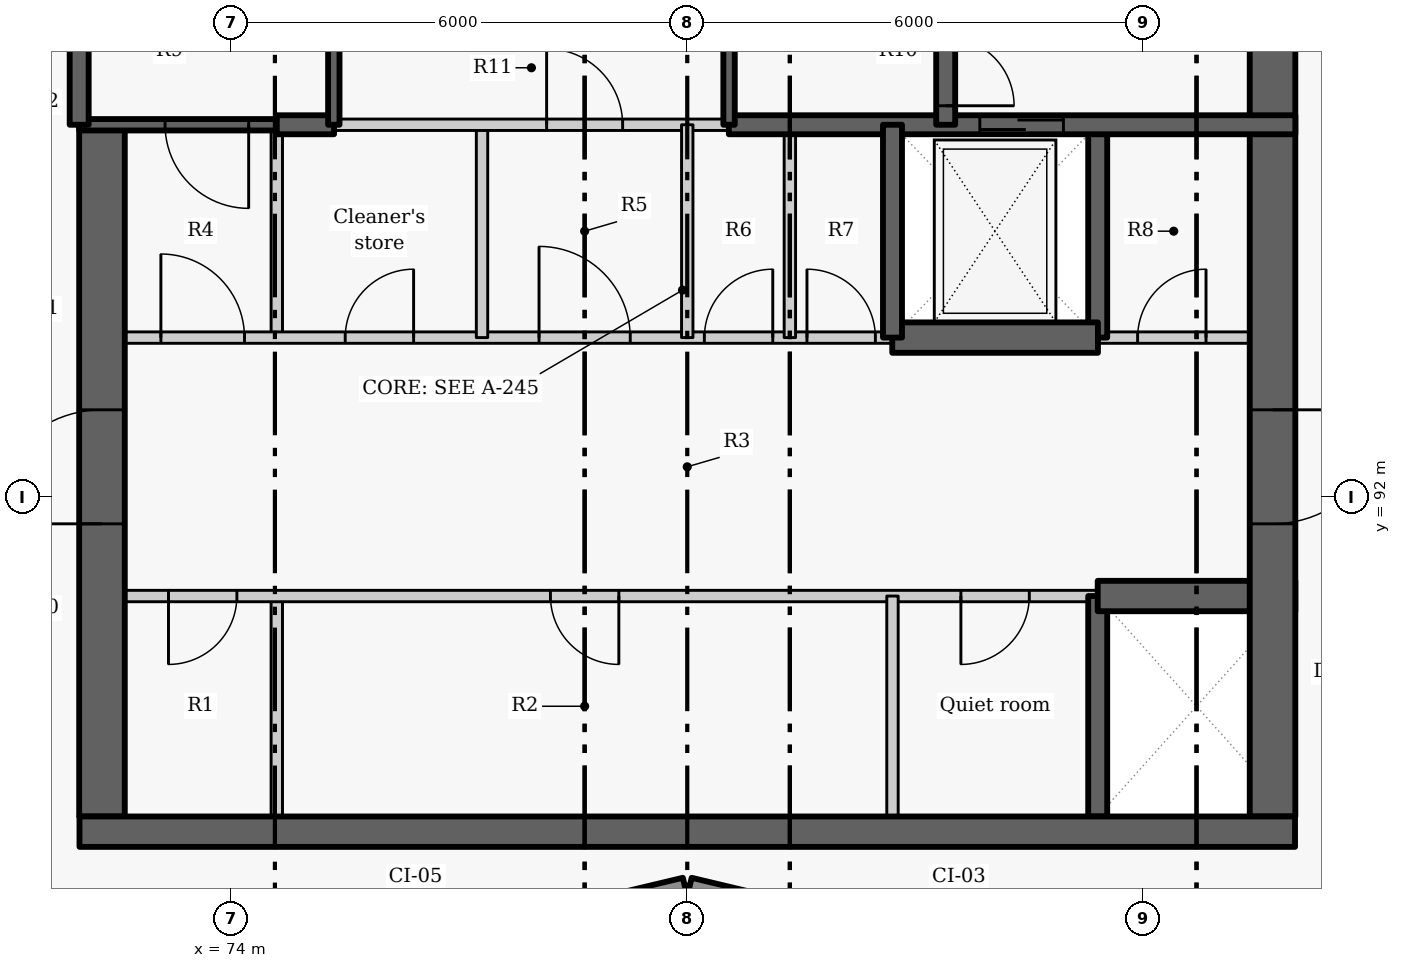
"""IFC4 building model, lengths in metres.
Left out: names, types, materials, properties, quantities, classifications, styles, units other than length and angle.
Written with IfcOpenShell. Run it as: python <this file> out.ifc"""

import sys

from ifc_helpers import new_model, si_unit, direction, frame, frame_2d, origin, place, context, subcontext, project, spatial, rectangle, extrude, element, fill, save


model = new_model("IFC4")
c1 = context("Model", 3, precision=1e-05, world=origin(), true_north=direction((0.0, 1.0)))
c2 = subcontext(c1, "Body", "Model", "MODEL_VIEW")
j1 = project(units=[si_unit("LENGTHUNIT", "METRE"), si_unit("PLANEANGLEUNIT", "RADIAN")], contexts=[c1])
p1 = place(None, origin())
s1 = spatial("IfcSite", under=j1, at=p1, CompositionType="ELEMENT")
p2 = place(p1, origin())
s2 = spatial("IfcBuilding", under=s1, at=p2, CompositionType="ELEMENT")
p3 = place(p2, frame((0.0, 0.0, 272.4)))
s3 = spatial("IfcBuildingStorey", under=s2, at=p3, CompositionType="ELEMENT", Elevation=272.4)
for number, where, z_axis, x_axis in (
    (1, (76.814, 86.119, 0.0), (0.0, 0.0, 1.0), (0.973, 0.232, 0.0)),
    (2, (80.029, 86.872, 0.0), (0.0, 0.0, 1.0), (0.973, -0.232, 0.0)),
):
    element("IfcWall", number, at=place(p3, frame(where, z_axis=z_axis, x_axis=x_axis)), inside=s3, PredefinedType="SOLIDWALL", context=c2, shape_type="SweptSolid", body=[
        extrude(rectangle(XDim=3.246, YDim=0.25, at=frame_2d((1.623, 0.0))), origin(), (0.0, 0.0, 1.0), 2.725),
    ])
p4 = place(p3, frame((74.6, 87.8, 0.0), z_axis=(0.0, 0.0, 1.0), x_axis=(0.0, 1.0, 0.0)))
e3 = element("IfcWall", 3, at=p4, inside=s3, PredefinedType="PARTITIONING", context=c2, shape_type="SweptSolid", body=[
    extrude(rectangle(XDim=2.9, YDim=0.15, at=frame_2d((1.45, 0.0))), origin(), (0.0, 0.0, 1.0), 3.325),
])
p5 = place(p3, frame((74.6, 94.1, 0.0), z_axis=(0.0, 0.0, 1.0), x_axis=(0.0, 1.0, 0.0)))
e4 = element("IfcWall", 4, at=p5, inside=s3, PredefinedType="PARTITIONING", context=c2, shape_type="SweptSolid", body=[
    extrude(rectangle(XDim=2.8, YDim=0.15, at=frame_2d((1.4, 0.0))), origin(), (0.0, 0.0, 1.0), 3.325),
])
p6 = place(p3, frame((85.4, 90.7, 0.0), z_axis=(0.0, 0.0, 1.0), x_axis=(-1.0, 0.0, 0.0)))
e5 = element("IfcWall", 5, at=p6, inside=s3, PredefinedType="PARTITIONING", context=c2, shape_type="SweptSolid", body=[
    extrude(rectangle(XDim=13.4, YDim=0.15, at=frame_2d((6.7, 0.0))), origin(), (0.0, 0.0, 1.0), 3.325),
])
p7 = place(p6, frame((11.325, 0.0, 0.0)))
e6 = element("IfcOpeningElement", 6, at=p7, cuts=e5, PredefinedType="OPENING", context=c2, shape_type="SweptSolid", body=[
    extrude(rectangle(XDim=0.9, YDim=2.1, at=frame_2d((0.45, 1.05))), frame((0.0, 0.085, 0.0), z_axis=(0.0, -1.0, 0.0), x_axis=(1.0, 0.0, 0.0)), (0.0, 0.0, 1.0), 0.17),
])
p8 = place(p6, frame((6.3, 0.0, 0.0)))
e7 = element("IfcOpeningElement", 7, at=p8, cuts=e5, PredefinedType="OPENING", context=c2, shape_type="SweptSolid", body=[
    extrude(rectangle(XDim=0.9, YDim=2.1, at=frame_2d((0.45, 1.05))), frame((0.0, 0.085, 0.0), z_axis=(0.0, -1.0, 0.0), x_axis=(1.0, 0.0, 0.0)), (0.0, 0.0, 1.0), 0.17),
])
p9 = place(p6, frame((0.9, 0.0, 0.0)))
e8 = element("IfcOpeningElement", 8, at=p9, cuts=e5, PredefinedType="OPENING", context=c2, shape_type="SweptSolid", body=[
    extrude(rectangle(XDim=0.9, YDim=2.1, at=frame_2d((0.45, 1.05))), frame((0.0, 0.085, 0.0), z_axis=(0.0, -1.0, 0.0), x_axis=(1.0, 0.0, 0.0)), (0.0, 0.0, 1.0), 0.17),
])
p10 = place(p3, frame((72.3, 87.8, -0.275), z_axis=(0.0, 0.0, 1.0), x_axis=(0.0, 1.0, 0.0)))
e9 = element("IfcWall", 9, at=p10, inside=s3, PredefinedType="SHEAR", context=c2, shape_type="SweptSolid", body=[
    extrude(rectangle(XDim=9.1, YDim=0.6, at=frame_2d((4.55, 0.0))), origin(), (0.0, 0.0, 1.0), 3.6),
])
p11 = place(p10, frame((3.85, 0.0, 0.275)))
e10 = element("IfcOpeningElement", 10, at=p11, cuts=e9, PredefinedType="OPENING", context=c2, shape_type="SweptSolid", body=[
    extrude(rectangle(XDim=1.5, YDim=2.1, at=frame_2d((0.75, 1.05))), frame((0.0, 0.31, 0.0), z_axis=(0.0, -1.0, 0.0), x_axis=(1.0, 0.0, 0.0)), (0.0, 0.0, 1.0), 0.62),
])
p12 = place(p3, frame((85.4, 87.8, -0.275), z_axis=(0.0, 0.0, 1.0), x_axis=(0.0, 1.0, 0.0)))
e11 = element("IfcWall", 11, at=p12, inside=s3, PredefinedType="SHEAR", context=c2, shape_type="SweptSolid", body=[
    extrude(rectangle(XDim=2.9, YDim=0.25, at=frame_2d((1.45, 0.0))), origin(), (0.0, 0.0, 1.0), 3.6),
])
p13 = place(p3, frame((85.4, 94.1, -0.275), z_axis=(0.0, 0.0, 1.0), x_axis=(0.0, 1.0, 0.0)))
e12 = element("IfcWall", 12, at=p13, inside=s3, PredefinedType="SHEAR", context=c2, shape_type="SweptSolid", body=[
    extrude(rectangle(XDim=2.8, YDim=0.25, at=frame_2d((1.4, 0.0))), origin(), (0.0, 0.0, 1.0), 3.6),
])
p14 = place(p3, frame((85.4, 90.7, -0.275), z_axis=(0.0, 0.0, 1.0), x_axis=(1.0, 0.0, 0.0)))
e13 = element("IfcWall", 13, at=p14, inside=s3, PredefinedType="SHEAR", context=c2, shape_type="SweptSolid", body=[
    extrude(rectangle(XDim=2.6, YDim=0.4, at=frame_2d((1.3, 0.0))), origin(), (0.0, 0.0, 1.0), 3.6),
])
p15 = place(p3, frame((87.7, 102.05, -0.275), z_axis=(0.0, 0.0, 1.0), x_axis=(0.0, -1.0, 0.0)))
e14 = element("IfcWall", 14, at=p15, inside=s3, PredefinedType="SHEAR", context=c2, shape_type="SweptSolid", body=[
    extrude(rectangle(XDim=14.25, YDim=0.6, at=frame_2d((7.125, 0.0))), origin(), (0.0, 0.0, 1.0), 3.6),
])
p16 = place(p15, frame((8.9, 0.0, 0.275)))
e15 = element("IfcOpeningElement", 15, at=p16, cuts=e14, PredefinedType="OPENING", context=c2, shape_type="SweptSolid", body=[
    extrude(rectangle(XDim=1.5, YDim=2.1, at=frame_2d((0.75, 1.05))), frame((0.0, 0.31, 0.0), z_axis=(0.0, -1.0, 0.0), x_axis=(1.0, 0.0, 0.0)), (0.0, 0.0, 1.0), 0.62),
])
p17 = place(p15, frame((2.025, 0.0, 0.275)))
e16 = element("IfcOpeningElement", 16, at=p17, cuts=e14, PredefinedType="OPENING", context=c2, shape_type="SweptSolid", body=[
    extrude(rectangle(XDim=1.1, YDim=2.1, at=frame_2d((0.55, 1.05))), frame((0.0, 0.31, 0.0), z_axis=(0.0, -1.0, 0.0), x_axis=(1.0, 0.0, 0.0)), (0.0, 0.0, 1.0), 0.62),
])
p18 = place(p3, frame((82.7, 87.8, 0.0), z_axis=(0.0, 0.0, 1.0), x_axis=(0.0, 1.0, 0.0)))
e17 = element("IfcWall", 17, at=p18, inside=s3, PredefinedType="PARTITIONING", context=c2, shape_type="SweptSolid", body=[
    extrude(rectangle(XDim=2.9, YDim=0.15, at=frame_2d((1.45, 0.0))), origin(), (0.0, 0.0, 1.0), 3.325),
])
p19 = place(p3, frame((72.0, 94.1, 0.0), z_axis=(0.0, 0.0, 1.0), x_axis=(1.0, 0.0, 0.0)))
e18 = element("IfcWall", 18, at=p19, inside=s3, PredefinedType="PARTITIONING", context=c2, shape_type="SweptSolid", body=[
    extrude(rectangle(XDim=10.703, YDim=0.15, at=frame_2d((5.352, 0.0))), origin(), (0.0, 0.0, 1.0), 3.325),
])
p20 = place(p19, frame((1.075, 0.0, 0.0)))
e19 = element("IfcOpeningElement", 19, at=p20, cuts=e18, PredefinedType="OPENING", context=c2, shape_type="SweptSolid", body=[
    extrude(rectangle(XDim=1.1, YDim=2.1, at=frame_2d((0.55, 1.05))), frame((0.0, 0.085, 0.0), z_axis=(0.0, -1.0, 0.0), x_axis=(1.0, 0.0, 0.0)), (0.0, 0.0, 1.0), 0.17),
])
p21 = place(p19, frame((3.5, 0.0, 0.0)))
e20 = element("IfcOpeningElement", 20, at=p21, cuts=e18, PredefinedType="OPENING", context=c2, shape_type="SweptSolid", body=[
    extrude(rectangle(XDim=0.9, YDim=2.1, at=frame_2d((0.45, 1.05))), frame((0.0, 0.085, 0.0), z_axis=(0.0, -1.0, 0.0), x_axis=(1.0, 0.0, 0.0)), (0.0, 0.0, 1.0), 0.17),
])
p22 = place(p19, frame((6.05, 0.0, 0.0)))
e21 = element("IfcOpeningElement", 21, at=p22, cuts=e18, PredefinedType="OPENING", context=c2, shape_type="SweptSolid", body=[
    extrude(rectangle(XDim=1.2, YDim=2.1, at=frame_2d((0.6, 1.05))), frame((0.0, 0.085, 0.0), z_axis=(0.0, -1.0, 0.0), x_axis=(1.0, 0.0, 0.0)), (0.0, 0.0, 1.0), 0.17),
])
p23 = place(p19, frame((8.225, 0.0, 0.0)))
e22 = element("IfcOpeningElement", 22, at=p23, cuts=e18, PredefinedType="OPENING", context=c2, shape_type="SweptSolid", body=[
    extrude(rectangle(XDim=0.9, YDim=2.1, at=frame_2d((0.45, 1.05))), frame((0.0, 0.085, 0.0), z_axis=(0.0, -1.0, 0.0), x_axis=(1.0, 0.0, 0.0)), (0.0, 0.0, 1.0), 0.17),
])
p24 = place(p19, frame((9.575, 0.0, 0.0)))
e23 = element("IfcOpeningElement", 23, at=p24, cuts=e18, PredefinedType="OPENING", context=c2, shape_type="SweptSolid", body=[
    extrude(rectangle(XDim=0.9, YDim=2.1, at=frame_2d((0.45, 1.05))), frame((0.0, 0.085, 0.0), z_axis=(0.0, -1.0, 0.0), x_axis=(1.0, 0.0, 0.0)), (0.0, 0.0, 1.0), 0.17),
])
p25 = place(p3, frame((85.397, 94.1, 0.0), z_axis=(0.0, 0.0, 1.0), x_axis=(1.0, 0.0, 0.0)))
e24 = element("IfcWall", 24, at=p25, inside=s3, PredefinedType="PARTITIONING", context=c2, shape_type="SweptSolid", body=[
    extrude(rectangle(XDim=2.603, YDim=0.15, at=frame_2d((1.302, 0.0))), origin(), (0.0, 0.0, 1.0), 3.325),
])
p26 = place(p25, frame((0.528, 0.0, 0.0)))
e25 = element("IfcOpeningElement", 25, at=p26, cuts=e24, PredefinedType="OPENING", context=c2, shape_type="SweptSolid", body=[
    extrude(rectangle(XDim=0.9, YDim=2.1, at=frame_2d((0.45, 1.05))), frame((0.0, 0.085, 0.0), z_axis=(0.0, -1.0, 0.0), x_axis=(1.0, 0.0, 0.0)), (0.0, 0.0, 1.0), 0.17),
])
p27 = place(p3, frame((82.697, 94.1, -0.275), z_axis=(0.0, 0.0, 1.0), x_axis=(1.0, 0.0, 0.0)))
e26 = element("IfcWall", 26, at=p27, inside=s3, PredefinedType="SHEAR", context=c2, shape_type="SweptSolid", body=[
    extrude(rectangle(XDim=2.706, YDim=0.4, at=frame_2d((1.353, 0.0))), origin(), (0.0, 0.0, 1.0), 3.6),
])
p28 = place(p3, frame((74.6, 96.9, -0.275), z_axis=(0.0, 0.0, 1.0), x_axis=(-1.0, 0.0, 0.0)))
e27 = element("IfcWall", 27, at=p28, inside=s3, PredefinedType="SHEAR", context=c2, shape_type="SweptSolid", body=[
    extrude(rectangle(XDim=2.6, YDim=0.15, at=frame_2d((1.3, 0.0))), origin(), (0.0, 0.0, 1.0), 3.6),
])
p29 = place(p28, frame((0.37, 0.0, 0.275)))
e28 = element("IfcOpeningElement", 28, at=p29, cuts=e27, PredefinedType="OPENING", context=c2, shape_type="SweptSolid", body=[
    extrude(rectangle(XDim=1.1, YDim=2.1, at=frame_2d((0.55, 1.05))), frame((0.0, 0.085, 0.0), z_axis=(0.0, -1.0, 0.0), x_axis=(1.0, 0.0, 0.0)), (0.0, 0.0, 1.0), 0.17),
])
p30 = place(p3, frame((77.3, 94.1, 0.0), z_axis=(0.0, 0.0, 1.0), x_axis=(0.0, 1.0, 0.0)))
e29 = element("IfcWall", 29, at=p30, inside=s3, PredefinedType="PARTITIONING", context=c2, shape_type="SweptSolid", body=[
    extrude(rectangle(XDim=2.8, YDim=0.15, at=frame_2d((1.4, 0.0))), origin(), (0.0, 0.0, 1.0), 3.325),
])
p31 = place(p3, frame((74.6, 96.9, -0.275), z_axis=(0.0, 0.0, 1.0), x_axis=(1.0, 0.0, 0.0)))
e30 = element("IfcWall", 30, at=p31, inside=s3, PredefinedType="SHEAR", context=c2, shape_type="SweptSolid", body=[
    extrude(rectangle(XDim=0.753, YDim=0.25, at=frame_2d((0.376, 0.0))), origin(), (0.0, 0.0, 1.0), 3.6),
])
p32 = place(p3, frame((80.547, 96.9, -0.275), z_axis=(0.0, 0.0, 1.0), x_axis=(1.0, 0.0, 0.0)))
e31 = element("IfcWall", 31, at=p32, inside=s3, PredefinedType="SHEAR", context=c2, shape_type="SweptSolid", body=[
    extrude(rectangle(XDim=7.453, YDim=0.25, at=frame_2d((3.727, 0.0))), origin(), (0.0, 0.0, 1.0), 3.6),
])
p33 = place(p32, frame((3.302, 0.0, 0.275)))
e32 = element("IfcOpeningElement", 32, at=p33, cuts=e31, PredefinedType="OPENING", context=c2, shape_type="SweptSolid", body=[
    extrude(rectangle(XDim=1.1, YDim=2.1, at=frame_2d((0.55, 1.05))), frame((0.0, 0.135, 0.0), z_axis=(0.0, -1.0, 0.0), x_axis=(1.0, 0.0, 0.0)), (0.0, 0.0, 1.0), 0.27),
])
p34 = place(p3, frame((75.347, 96.9, 0.0), z_axis=(0.0, 0.0, 1.0), x_axis=(1.0, 0.0, 0.0)))
e33 = element("IfcWall", 33, at=p34, inside=s3, PredefinedType="PARTITIONING", context=c2, shape_type="SweptSolid", body=[
    extrude(rectangle(XDim=5.206, YDim=0.15, at=frame_2d((2.603, 0.0))), origin(), (0.0, 0.0, 1.0), 3.325),
])
p35 = place(p34, frame((2.803, 0.0, 0.0)))
e34 = element("IfcOpeningElement", 34, at=p35, cuts=e33, PredefinedType="OPENING", context=c2, shape_type="SweptSolid", body=[
    extrude(rectangle(XDim=1.0, YDim=2.1, at=frame_2d((0.5, 1.05))), frame((0.0, 0.085, 0.0), z_axis=(0.0, -1.0, 0.0), x_axis=(1.0, 0.0, 0.0)), (0.0, 0.0, 1.0), 0.17),
])
for number, where, z_axis, x_axis in (
    (35, (80.0, 94.1, 0.0), (0.0, 0.0, 1.0), (0.0, 1.0, 0.0)),
    (36, (81.35, 94.1, 0.0), (0.0, 0.0, 1.0), (0.0, 1.0, 0.0)),
):
    element("IfcWall", number, at=place(p3, frame(where, z_axis=z_axis, x_axis=x_axis)), inside=s3, PredefinedType="PARTITIONING", context=c2, shape_type="SweptSolid", body=[
        extrude(rectangle(XDim=2.8, YDim=0.15, at=frame_2d((1.4, 0.0))), origin(), (0.0, 0.0, 1.0), 3.325),
    ])
p36 = place(p3, frame((82.7, 94.1, -0.275), z_axis=(0.0, 0.0, 1.0), x_axis=(0.0, 1.0, 0.0)))
e37 = element("IfcWall", 37, at=p36, inside=s3, PredefinedType="SHEAR", context=c2, shape_type="SweptSolid", body=[
    extrude(rectangle(XDim=2.8, YDim=0.25, at=frame_2d((1.4, 0.0))), origin(), (0.0, 0.0, 1.0), 3.6),
])
p37 = place(p3, frame((75.35, 96.9, -0.275), z_axis=(0.0, 0.0, 1.0), x_axis=(0.0, 1.0, 0.0)))
e38 = element("IfcWall", 38, at=p37, inside=s3, PredefinedType="SHEAR", context=c2, shape_type="SweptSolid", body=[
    extrude(rectangle(XDim=1.503, YDim=0.15, at=frame_2d((0.751, 0.0))), origin(), (0.0, 0.0, 1.0), 3.6),
])
p38 = place(p3, frame((72.0, 96.9, -0.275), z_axis=(0.0, 0.0, 1.0), x_axis=(0.0, 1.0, 0.0)))
e39 = element("IfcWall", 39, at=p38, inside=s3, PredefinedType="SHEAR", context=c2, shape_type="SweptSolid", body=[
    extrude(rectangle(XDim=5.15, YDim=0.25, at=frame_2d((2.575, 0.0))), origin(), (0.0, 0.0, 1.0), 3.6),
])
p39 = place(p3, frame((83.4, 102.05, -0.275), z_axis=(0.0, 0.0, 1.0), x_axis=(0.0, -1.0, 0.0)))
e40 = element("IfcWall", 40, at=p39, inside=s3, PredefinedType="SHEAR", context=c2, shape_type="SweptSolid", body=[
    extrude(rectangle(XDim=5.15, YDim=0.25, at=frame_2d((2.575, 0.0))), origin(), (0.0, 0.0, 1.0), 3.6),
])
p40 = place(p39, frame((4.0, 0.0, 0.275)))
e41 = element("IfcOpeningElement", 41, at=p40, cuts=e40, PredefinedType="OPENING", context=c2, shape_type="SweptSolid", body=[
    extrude(rectangle(XDim=0.9, YDim=2.1, at=frame_2d((0.45, 1.05))), frame((0.0, 0.135, 0.0), z_axis=(0.0, -1.0, 0.0), x_axis=(1.0, 0.0, 0.0)), (0.0, 0.0, 1.0), 0.27),
])
p41 = place(p3, frame((80.55, 96.9, -0.275), z_axis=(0.0, 0.0, 1.0), x_axis=(0.0, 1.0, 0.0)))
e42 = element("IfcWall", 42, at=p41, inside=s3, PredefinedType="SHEAR", context=c2, shape_type="SweptSolid", body=[
    extrude(rectangle(XDim=1.503, YDim=0.15, at=frame_2d((0.751, 0.0))), origin(), (0.0, 0.0, 1.0), 3.6),
])
p42 = place(p3, frame((72.004, 87.6, -0.275), z_axis=(0.0, 0.0, 1.0), x_axis=(1.0, 0.0, 0.0)))
e43 = element("IfcWall", 43, at=p42, inside=s3, PredefinedType="SHEAR", context=c2, shape_type="SweptSolid", body=[
    extrude(rectangle(XDim=15.992, YDim=0.4, at=frame_2d((7.996, 0.0))), origin(), (0.0, 0.0, 1.0), 3.6),
])
p43 = place(p7, origin())
e44 = element("IfcDoor", 44, at=p43, inside=s3, OperationType="SINGLE_SWING_RIGHT", PredefinedType="DOOR", context=c2, shape_type="SweptSolid", body=[
    extrude(rectangle(XDim=0.9, YDim=2.1, at=frame_2d((0.45, 1.05))), frame((0.0, 0.025, 0.0), z_axis=(0.0, -1.0, 0.0), x_axis=(1.0, 0.0, 0.0)), (0.0, 0.0, 1.0), 0.05),
])
fill(e6, e44)
p44 = place(p8, origin())
e45 = element("IfcDoor", 45, at=p44, inside=s3, OperationType="SINGLE_SWING_LEFT", PredefinedType="DOOR", context=c2, shape_type="SweptSolid", body=[
    extrude(rectangle(XDim=0.9, YDim=2.1, at=frame_2d((0.45, 1.05))), frame((0.0, 0.025, 0.0), z_axis=(0.0, -1.0, 0.0), x_axis=(1.0, 0.0, 0.0)), (0.0, 0.0, 1.0), 0.05),
])
fill(e7, e45)
p45 = place(p9, origin())
e46 = element("IfcDoor", 46, at=p45, inside=s3, OperationType="SINGLE_SWING_RIGHT", PredefinedType="DOOR", context=c2, shape_type="SweptSolid", body=[
    extrude(rectangle(XDim=0.9, YDim=2.1, at=frame_2d((0.45, 1.05))), frame((0.0, 0.025, 0.0), z_axis=(0.0, -1.0, 0.0), x_axis=(1.0, 0.0, 0.0)), (0.0, 0.0, 1.0), 0.05),
])
fill(e8, e46)
p46 = place(p20, origin())
e47 = element("IfcDoor", 47, at=p46, inside=s3, OperationType="SINGLE_SWING_LEFT", PredefinedType="DOOR", context=c2, shape_type="SweptSolid", body=[
    extrude(rectangle(XDim=1.1, YDim=2.1, at=frame_2d((0.55, 1.05))), frame((0.0, 0.025, 0.0), z_axis=(0.0, -1.0, 0.0), x_axis=(1.0, 0.0, 0.0)), (0.0, 0.0, 1.0), 0.05),
])
fill(e19, e47)
p47 = place(p21, origin())
e48 = element("IfcDoor", 48, at=p47, inside=s3, OperationType="SINGLE_SWING_RIGHT", PredefinedType="DOOR", context=c2, shape_type="SweptSolid", body=[
    extrude(rectangle(XDim=0.9, YDim=2.1, at=frame_2d((0.45, 1.05))), frame((0.0, 0.025, 0.0), z_axis=(0.0, -1.0, 0.0), x_axis=(1.0, 0.0, 0.0)), (0.0, 0.0, 1.0), 0.05),
])
fill(e20, e48)
p48 = place(p22, origin())
e49 = element("IfcDoor", 49, at=p48, inside=s3, OperationType="DOUBLE_DOOR_SINGLE_SWING", PredefinedType="DOOR", context=c2, shape_type="SweptSolid", body=[
    extrude(rectangle(XDim=1.2, YDim=2.1, at=frame_2d((0.6, 1.05))), frame((0.0, 0.025, 0.0), z_axis=(0.0, -1.0, 0.0), x_axis=(1.0, 0.0, 0.0)), (0.0, 0.0, 1.0), 0.05),
])
fill(e21, e49)
p49 = place(p23, origin())
e50 = element("IfcDoor", 50, at=p49, inside=s3, OperationType="SINGLE_SWING_RIGHT", PredefinedType="DOOR", context=c2, shape_type="SweptSolid", body=[
    extrude(rectangle(XDim=0.9, YDim=2.1, at=frame_2d((0.45, 1.05))), frame((0.0, 0.025, 0.0), z_axis=(0.0, -1.0, 0.0), x_axis=(1.0, 0.0, 0.0)), (0.0, 0.0, 1.0), 0.05),
])
fill(e22, e50)
p50 = place(p24, origin())
e51 = element("IfcDoor", 51, at=p50, inside=s3, OperationType="SINGLE_SWING_LEFT", PredefinedType="DOOR", context=c2, shape_type="SweptSolid", body=[
    extrude(rectangle(XDim=0.9, YDim=2.1, at=frame_2d((0.45, 1.05))), frame((0.0, 0.025, 0.0), z_axis=(0.0, -1.0, 0.0), x_axis=(1.0, 0.0, 0.0)), (0.0, 0.0, 1.0), 0.05),
])
fill(e23, e51)
p51 = place(p33, origin())
e52 = element("IfcDoor", 52, at=p51, inside=s3, OperationType="SLIDING_TO_LEFT", PredefinedType="DOOR", context=c2, shape_type="SweptSolid", body=[
    extrude(rectangle(XDim=1.1, YDim=2.1, at=frame_2d((0.55, 1.05))), frame((0.0, 0.025, 0.0), z_axis=(0.0, -1.0, 0.0), x_axis=(1.0, 0.0, 0.0)), (0.0, 0.0, 1.0), 0.05),
])
fill(e32, e52)
p52 = place(p26, origin())
e53 = element("IfcDoor", 53, at=p52, inside=s3, OperationType="SINGLE_SWING_RIGHT", PredefinedType="DOOR", context=c2, shape_type="SweptSolid", body=[
    extrude(rectangle(XDim=0.9, YDim=2.1, at=frame_2d((0.45, 1.05))), frame((0.0, 0.025, 0.0), z_axis=(0.0, -1.0, 0.0), x_axis=(1.0, 0.0, 0.0)), (0.0, 0.0, 1.0), 0.05),
])
fill(e25, e53)
p53 = place(p35, origin())
e54 = element("IfcDoor", 54, at=p53, inside=s3, OperationType="SINGLE_SWING_LEFT", PredefinedType="DOOR", context=c2, shape_type="SweptSolid", body=[
    extrude(rectangle(XDim=1.0, YDim=2.1, at=frame_2d((0.5, 1.05))), frame((0.0, 0.025, 0.0), z_axis=(0.0, -1.0, 0.0), x_axis=(1.0, 0.0, 0.0)), (0.0, 0.0, 1.0), 0.05),
])
fill(e34, e54)
p54 = place(p29, origin())
e55 = element("IfcDoor", 55, at=p54, inside=s3, OperationType="SINGLE_SWING_LEFT", PredefinedType="DOOR", context=c2, shape_type="SweptSolid", body=[
    extrude(rectangle(XDim=1.1, YDim=2.1, at=frame_2d((0.55, 1.05))), frame((0.0, 0.025, 0.0), z_axis=(0.0, -1.0, 0.0), x_axis=(1.0, 0.0, 0.0)), (0.0, 0.0, 1.0), 0.05),
])
fill(e28, e55)
p55 = place(p40, origin())
e56 = element("IfcDoor", 56, at=p55, inside=s3, OperationType="SINGLE_SWING_RIGHT", PredefinedType="DOOR", context=c2, shape_type="SweptSolid", body=[
    extrude(rectangle(XDim=0.9, YDim=2.1, at=frame_2d((0.45, 1.05))), frame((0.0, 0.025, 0.0), z_axis=(0.0, -1.0, 0.0), x_axis=(1.0, 0.0, 0.0)), (0.0, 0.0, 1.0), 0.05),
])
fill(e41, e56)
p56 = place(p16, origin())
e57 = element("IfcDoor", 57, at=p56, inside=s3, OperationType="DOUBLE_DOOR_SINGLE_SWING", PredefinedType="DOOR", context=c2, shape_type="SweptSolid", body=[
    extrude(rectangle(XDim=1.5, YDim=2.1, at=frame_2d((0.75, 1.05))), frame((0.0, 0.025, 0.0), z_axis=(0.0, -1.0, 0.0), x_axis=(1.0, 0.0, 0.0)), (0.0, 0.0, 1.0), 0.05),
])
fill(e15, e57)
p57 = place(p11, origin())
e58 = element("IfcDoor", 58, at=p57, inside=s3, OperationType="DOUBLE_DOOR_SINGLE_SWING", PredefinedType="DOOR", context=c2, shape_type="SweptSolid", body=[
    extrude(rectangle(XDim=1.5, YDim=2.1, at=frame_2d((0.75, 1.05))), frame((0.0, 0.025, 0.0), z_axis=(0.0, -1.0, 0.0), x_axis=(1.0, 0.0, 0.0)), (0.0, 0.0, 1.0), 0.05),
])
fill(e10, e58)
save(model, sys.argv[1])
